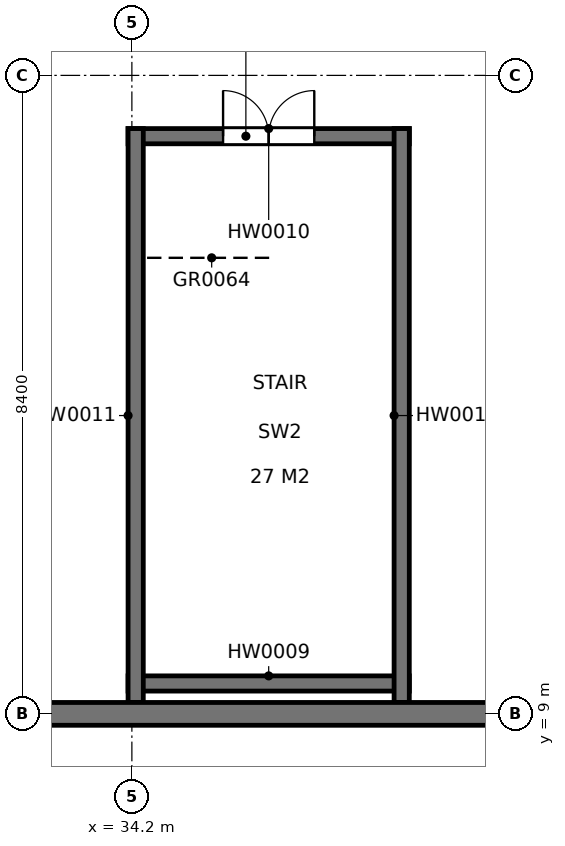
"""IFC4 building model, lengths in metres.
Left out: names, types, materials, properties, quantities, classifications, styles, units other than length and angle.
Written with IfcOpenShell. Run it as: python <this file> out.ifc"""

import sys

from ifc_helpers import new_model, si_unit, direction, frame, frame_2d, origin, place, context, subcontext, project, spatial, rectangle, extrude, element, fill, save


model = new_model("IFC4")
c1 = context("Model", 3, precision=1e-05, world=origin(), true_north=direction((0.0, 1.0)))
c2 = subcontext(c1, "Body", "Model", "MODEL_VIEW")
j1 = project(units=[si_unit("LENGTHUNIT", "METRE"), si_unit("PLANEANGLEUNIT", "RADIAN")], contexts=[c1])
p1 = place(None, origin())
s1 = spatial("IfcSite", under=j1, at=p1, CompositionType="ELEMENT")
p2 = place(p1, origin())
s2 = spatial("IfcBuilding", under=s1, at=p2, CompositionType="ELEMENT")
p3 = place(p2, frame((0.0, 0.0, 19.2)))
s3 = spatial("IfcBuildingStorey", under=s2, at=p3, CompositionType="ELEMENT", Elevation=19.2)
p4 = place(p3, frame((0.6, 9.0, 0.0), z_axis=(0.0, 0.0, 1.0), x_axis=(1.0, 0.0, 0.0)))
e1 = element("IfcWall", 1, at=p4, inside=s3, PredefinedType="SOLIDWALL", context=c2, shape_type="SweptSolid", body=[
    extrude(rectangle(XDim=42.0, YDim=0.3, at=frame_2d((21.0, 0.0))), origin(), (0.0, 0.0, 1.0), 5.056),
])
p5 = place(p3, frame((34.15, 9.4, 0.0), z_axis=(0.0, 0.0, 1.0), x_axis=(1.0, 0.0, 0.0)))
e2 = element("IfcWall", 2, at=p5, inside=s3, PredefinedType="SOLIDWALL", context=c2, shape_type="SweptSolid", body=[
    extrude(rectangle(XDim=3.7, YDim=0.2, at=frame_2d((1.85, 0.0))), origin(), (0.0, 0.0, 1.0), 3.3),
])
p6 = place(p3, frame((34.15, 16.6, 0.0), z_axis=(0.0, 0.0, 1.0), x_axis=(1.0, 0.0, 0.0)))
e3 = element("IfcWall", 3, at=p6, inside=s3, PredefinedType="SOLIDWALL", context=c2, shape_type="SweptSolid", body=[
    extrude(rectangle(XDim=3.7, YDim=0.2, at=frame_2d((1.85, 0.0))), origin(), (0.0, 0.0, 1.0), 3.3),
])
p7 = place(p6, frame((1.25, 0.0, 0.0)))
e4 = element("IfcOpeningElement", 4, at=p7, cuts=e3, PredefinedType="OPENING", context=c2, shape_type="SweptSolid", body=[
    extrude(rectangle(XDim=1.2, YDim=2.1, at=frame_2d((0.6, 1.05))), frame((0.0, 0.11, 0.0), z_axis=(0.0, -1.0, 0.0), x_axis=(1.0, 0.0, 0.0)), (0.0, 0.0, 1.0), 0.22),
])
for number, where, z_axis, x_axis in (
    (5, (34.25, 9.15, 0.0), (0.0, 0.0, 1.0), (0.0, 1.0, 0.0)),
    (6, (37.75, 9.15, 0.0), (0.0, 0.0, 1.0), (0.0, 1.0, 0.0)),
):
    element("IfcWall", number, at=place(p3, frame(where, z_axis=z_axis, x_axis=x_axis)), inside=s3, PredefinedType="SOLIDWALL", context=c2, shape_type="SweptSolid", body=[
        extrude(rectangle(XDim=7.55, YDim=0.2, at=frame_2d((3.775, 0.0))), origin(), (0.0, 0.0, 1.0), 3.3),
    ])
p8 = place(p7, origin())
e7 = element("IfcDoor", 7, at=p8, inside=s3, OperationType="DOUBLE_DOOR_SINGLE_SWING", PredefinedType="DOOR", context=c2, shape_type="SweptSolid", body=[
    extrude(rectangle(XDim=1.2, YDim=2.1, at=frame_2d((0.6, 1.05))), frame((0.0, 0.025, 0.0), z_axis=(0.0, -1.0, 0.0), x_axis=(1.0, 0.0, 0.0)), (0.0, 0.0, 1.0), 0.05),
])
fill(e4, e7)
save(model, sys.argv[1])
